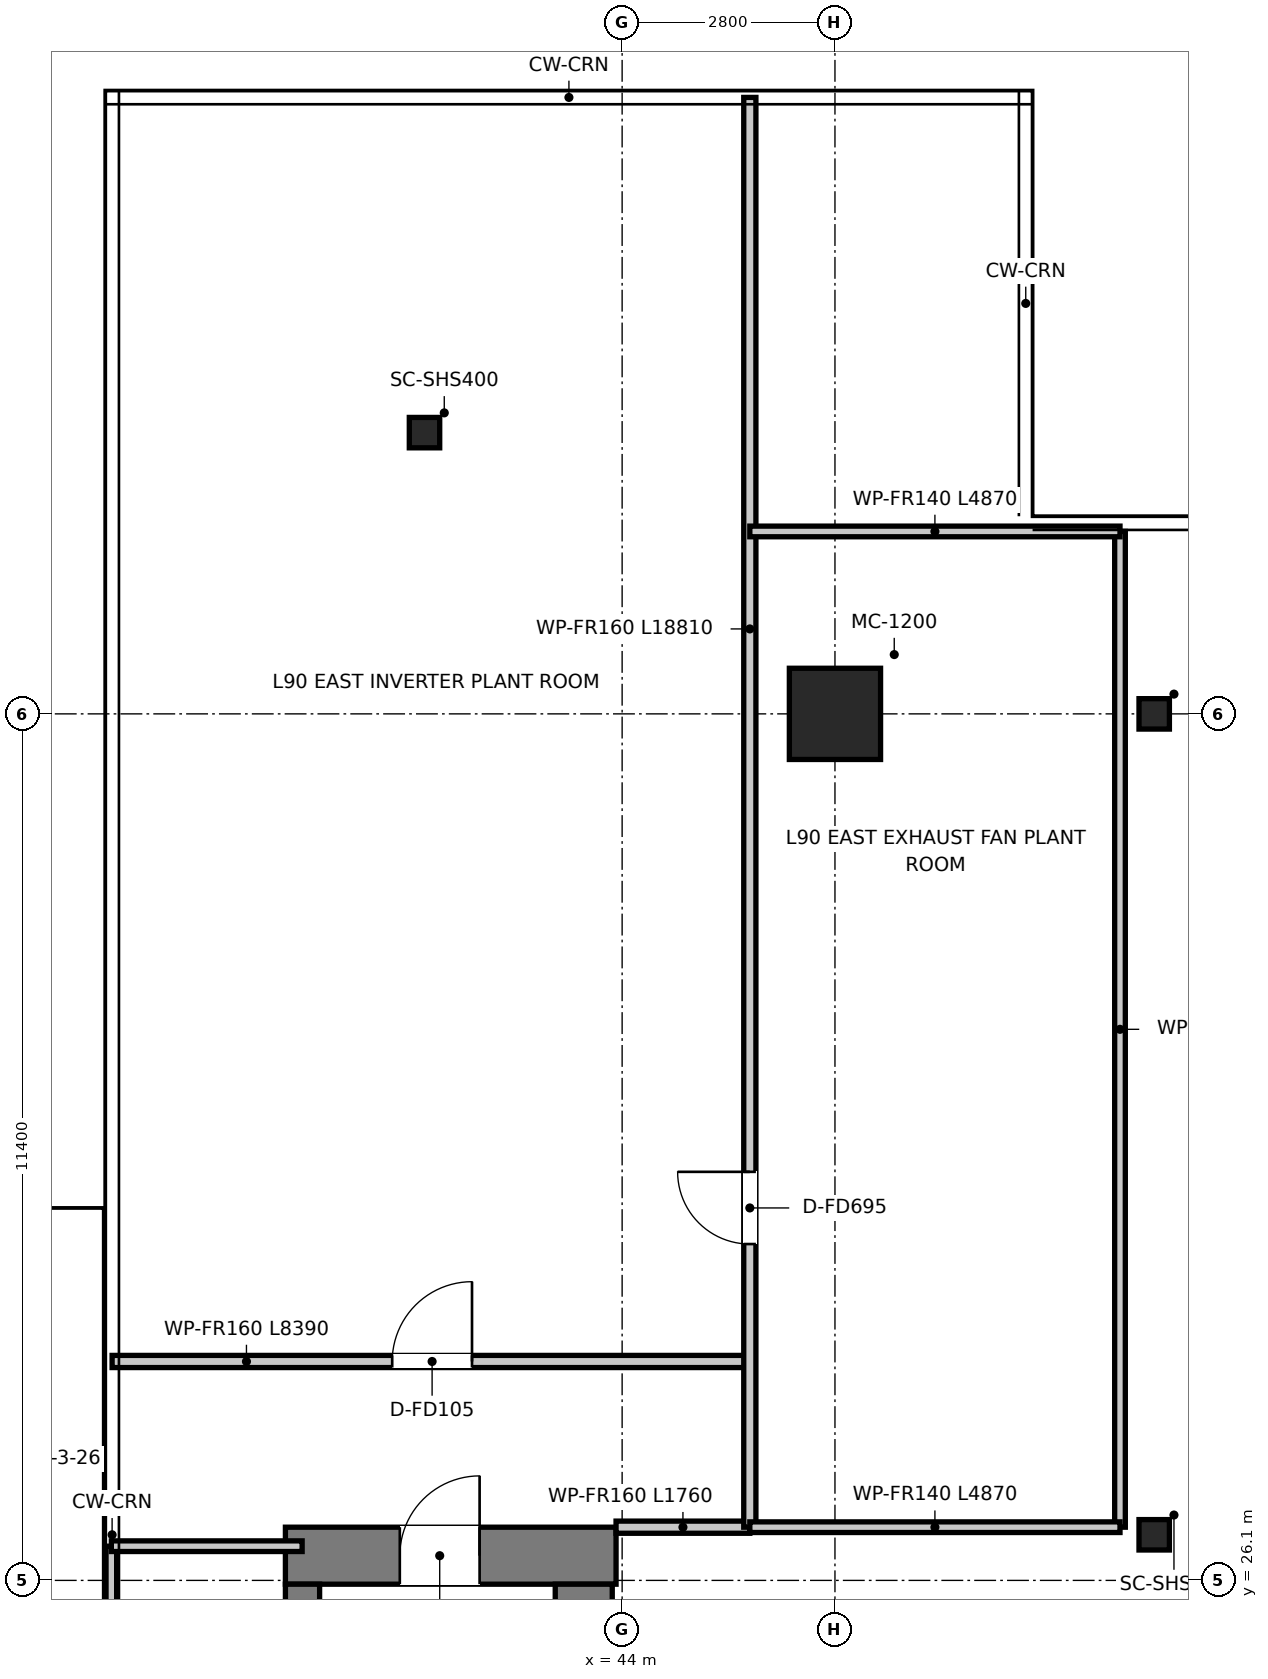
"""IFC4 building model, lengths in metres.
Left out: names, types, materials, properties, quantities, classifications, styles, units other than length and angle.
Written with IfcOpenShell. Run it as: python <this file> out.ifc"""

import sys

from ifc_helpers import new_model, si_unit, direction, frame, frame_2d, origin, origin_2d, place, context, subcontext, project, spatial, rectangle, hollow_rectangle, extrude, source, transform, mapped, element, fill, save


model = new_model("IFC4")
c1 = context("Model", 3, precision=1e-05, world=origin(), true_north=direction((0.0, 1.0)))
c2 = subcontext(c1, "Body", "Model", "MODEL_VIEW")
j1 = project(units=[si_unit("LENGTHUNIT", "METRE"), si_unit("PLANEANGLEUNIT", "RADIAN")], contexts=[c1])
p1 = place(None, origin())
s1 = spatial("IfcSite", under=j1, at=p1, CompositionType="ELEMENT")
p2 = place(p1, origin())
s2 = spatial("IfcBuilding", under=s1, at=p2, CompositionType="ELEMENT")
p3 = place(p2, frame((0.0, 0.0, 367.05)))
s3 = spatial("IfcBuildingStorey", under=s2, at=p3, CompositionType="ELEMENT", Elevation=367.05)
p4 = place(p3, frame((39.57, 26.425, 0.0), z_axis=(0.0, 0.0, 1.0), x_axis=(1.0, 0.0, 0.0)))
e1 = element("IfcWall", 1, at=p4, inside=s3, PredefinedType="SHEAR", context=c2, shape_type="SweptSolid", body=[
    extrude(rectangle(XDim=4.35, YDim=0.75, at=frame_2d((2.175, 0.0))), origin(), (0.0, 0.0, 1.0), 3.8),
])
p5 = place(p4, frame((1.505, 0.0, 0.0)))
e2 = element("IfcOpeningElement", 2, at=p5, cuts=e1, PredefinedType="OPENING", context=c2, shape_type="SweptSolid", body=[
    extrude(rectangle(XDim=1.05, YDim=2.1, at=frame_2d((0.525, 1.05))), frame((0.0, 0.385, 0.0), z_axis=(0.0, -1.0, 0.0), x_axis=(1.0, 0.0, 0.0)), (0.0, 0.0, 1.0), 0.77),
])
p6 = place(p3, frame((39.795, 13.22, 0.0), z_axis=(0.0, 0.0, 1.0), x_axis=(0.0, 1.0, 0.0)))
e3 = element("IfcWall", 3, at=p6, inside=s3, PredefinedType="SHEAR", context=c2, shape_type="SweptSolid", body=[
    extrude(rectangle(XDim=12.83, YDim=0.45, at=frame_2d((6.415, 0.0))), origin(), (0.0, 0.0, 1.0), 3.8),
])
p7 = place(p6, frame((10.58, 0.0, 0.0)))
e4 = element("IfcOpeningElement", 4, at=p7, cuts=e3, PredefinedType="OPENING", context=c2, shape_type="SweptSolid", body=[
    extrude(rectangle(XDim=1.1, YDim=2.15, at=frame_2d((0.55, 1.075))), frame((0.0, 0.235, 0.0), z_axis=(0.0, -1.0, 0.0), x_axis=(1.0, 0.0, 0.0)), (0.0, 0.0, 1.0), 0.47),
])
p8 = place(p3, frame((43.495, 11.25, 0.0), z_axis=(0.0, 0.0, 1.0), x_axis=(0.0, 1.0, 0.0)))
e5 = element("IfcWall", 5, at=p8, inside=s3, PredefinedType="SHEAR", context=c2, shape_type="SweptSolid", body=[
    extrude(rectangle(XDim=14.8, YDim=0.75, at=frame_2d((7.4, 0.0))), origin(), (0.0, 0.0, 1.0), 3.8),
])
m1 = source(origin(), c2, "Body", "SweptSolid", [
    extrude(rectangle(XDim=1.2, YDim=1.2, at=origin_2d()), origin(), (0.0, 0.0, 1.0), 3.8),
])
p9 = place(p3, frame((46.8, 37.5, 0.0), z_axis=(0.0, 0.0, 1.0), x_axis=(1.0, 0.0, 0.0)))
e6 = element("IfcColumn", 6, at=p9, inside=s3, PredefinedType="USERDEFINED", context=c2, shape_type="MappedRepresentation", body=[
    mapped(m1, transform((0.0, 0.0, 0.0), x_axis=(1.0, 0.0, 0.0), y_axis=(0.0, 1.0, 0.0), z_axis=(0.0, 0.0, 1.0), scale=1.0)),
])
m2 = source(origin(), c2, "Body", "SweptSolid", [
    extrude(hollow_rectangle(XDim=0.4, YDim=0.4, WallThickness=0.025, at=origin_2d()), origin(), (0.0, 0.0, 1.0), 3.8),
])
for number, where, z_axis, x_axis in (
    (7, (51.0, 26.7, 0.0), (0.0, 0.0, 1.0), (1.0, 0.0, 0.0)),
    (8, (51.0, 37.5, 0.0), (0.0, 0.0, 1.0), (1.0, 0.0, 0.0)),
    (9, (41.4, 41.2, 0.0), (0.0, 0.0, 1.0), (1.0, 0.0, 0.0)),
):
    element("IfcColumn", number, at=place(p3, frame(where, z_axis=z_axis, x_axis=x_axis)), inside=s3, PredefinedType="COLUMN", context=c2, shape_type="MappedRepresentation", body=[
        mapped(m2, transform((0.0, 0.0, 0.0), x_axis=(1.0, 0.0, 0.0), y_axis=(0.0, 1.0, 0.0), z_axis=(0.0, 0.0, 1.0), scale=1.0)),
    ])
p10 = place(p3, frame((37.28, 22.95, 0.0), z_axis=(0.0, 0.0, 1.0), x_axis=(0.0, 1.0, 0.0)))
e10 = element("IfcWall", 10, at=p10, inside=s3, PredefinedType="PARTITIONING", context=c2, shape_type="SweptSolid", body=[
    extrude(rectangle(XDim=3.6, YDim=0.14, at=frame_2d((1.8, 0.0))), origin(), (0.0, 0.0, 1.0), 3.5),
])
p11 = place(p3, frame((37.28, 26.55, 0.0), z_axis=(0.0, 0.0, 1.0), x_axis=(1.0, 0.0, 0.0)))
e11 = element("IfcWall", 11, at=p11, inside=s3, PredefinedType="PARTITIONING", context=c2, shape_type="SweptSolid", body=[
    extrude(rectangle(XDim=2.51, YDim=0.14, at=frame_2d((1.255, 0.0))), origin(), (0.0, 0.0, 1.0), 3.5),
])
p12 = place(p3, frame((37.29, 28.98, 0.0), z_axis=(0.0, 0.0, 1.0), x_axis=(1.0, 0.0, 0.0)))
e12 = element("IfcWall", 12, at=p12, inside=s3, PredefinedType="PARTITIONING", context=c2, shape_type="SweptSolid", body=[
    extrude(rectangle(XDim=8.39, YDim=0.16, at=frame_2d((4.195, 0.0))), origin(), (0.0, 0.0, 1.0), 3.01),
])
p13 = place(p12, frame((3.685, 0.0, 0.0)))
e13 = element("IfcOpeningElement", 13, at=p13, cuts=e12, PredefinedType="OPENING", context=c2, shape_type="SweptSolid", body=[
    extrude(rectangle(XDim=1.05, YDim=2.1, at=frame_2d((0.525, 1.05))), frame((0.0, 0.09, 0.0), z_axis=(0.0, -1.0, 0.0), x_axis=(1.0, 0.0, 0.0)), (0.0, 0.0, 1.0), 0.18),
])
p14 = place(p3, frame((43.92, 26.8, 0.0), z_axis=(0.0, 0.0, 1.0), x_axis=(1.0, 0.0, 0.0)))
e14 = element("IfcWall", 14, at=p14, inside=s3, PredefinedType="PARTITIONING", context=c2, shape_type="SweptSolid", body=[
    extrude(rectangle(XDim=1.76, YDim=0.16, at=frame_2d((0.88, 0.0))), origin(), (0.0, 0.0, 1.0), 3.5),
])
p15 = place(p3, frame((45.68, 26.8, 0.0), z_axis=(0.0, 0.0, 1.0), x_axis=(0.0, 1.0, 0.0)))
e15 = element("IfcWall", 15, at=p15, inside=s3, PredefinedType="PARTITIONING", context=c2, shape_type="SweptSolid", body=[
    extrude(rectangle(XDim=18.81, YDim=0.16, at=frame_2d((9.405, 0.0))), origin(), (0.0, 0.0, 1.0), 3.01),
])
p16 = place(p15, frame((3.725, 0.0, 0.0)))
e16 = element("IfcOpeningElement", 16, at=p16, cuts=e15, PredefinedType="OPENING", context=c2, shape_type="SweptSolid", body=[
    extrude(rectangle(XDim=0.95, YDim=2.1, at=frame_2d((0.475, 1.05))), frame((0.0, 0.09, 0.0), z_axis=(0.0, -1.0, 0.0), x_axis=(1.0, 0.0, 0.0)), (0.0, 0.0, 1.0), 0.18),
])
p17 = place(p3, frame((50.55, 26.8, 0.0), z_axis=(0.0, 0.0, 1.0), x_axis=(0.0, 1.0, 0.0)))
e17 = element("IfcWall", 17, at=p17, inside=s3, PredefinedType="PARTITIONING", context=c2, shape_type="SweptSolid", body=[
    extrude(rectangle(XDim=13.1, YDim=0.14, at=frame_2d((6.55, 0.0))), origin(), (0.0, 0.0, 1.0), 3.01),
])
p18 = place(p3, frame((45.68, 26.8, 0.0), z_axis=(0.0, 0.0, 1.0), x_axis=(1.0, 0.0, 0.0)))
e18 = element("IfcWall", 18, at=p18, inside=s3, PredefinedType="PARTITIONING", context=c2, shape_type="SweptSolid", body=[
    extrude(rectangle(XDim=4.87, YDim=0.14, at=frame_2d((2.435, 0.0))), origin(), (0.0, 0.0, 1.0), 3.01),
])
p19 = place(p3, frame((45.68, 39.9, 0.0), z_axis=(0.0, 0.0, 1.0), x_axis=(1.0, 0.0, 0.0)))
e19 = element("IfcWall", 19, at=p19, inside=s3, PredefinedType="PARTITIONING", context=c2, shape_type="SweptSolid", body=[
    extrude(rectangle(XDim=4.87, YDim=0.14, at=frame_2d((2.435, 0.0))), origin(), (0.0, 0.0, 1.0), 3.5),
])
p20 = place(p5, origin())
e20 = element("IfcDoor", 20, at=p20, inside=s3, OperationType="SINGLE_SWING_RIGHT", PredefinedType="DOOR", context=c2, shape_type="SweptSolid", body=[
    extrude(rectangle(XDim=1.05, YDim=2.1, at=frame_2d((0.525, 1.05))), frame((0.0, 0.025, 0.0), z_axis=(0.0, -1.0, 0.0), x_axis=(1.0, 0.0, 0.0)), (0.0, 0.0, 1.0), 0.05),
])
fill(e2, e20)
p21 = place(p13, origin())
e21 = element("IfcDoor", 21, at=p21, inside=s3, OperationType="SINGLE_SWING_RIGHT", PredefinedType="DOOR", context=c2, shape_type="SweptSolid", body=[
    extrude(rectangle(XDim=1.05, YDim=2.1, at=frame_2d((0.525, 1.05))), frame((0.0, 0.025, 0.0), z_axis=(0.0, -1.0, 0.0), x_axis=(1.0, 0.0, 0.0)), (0.0, 0.0, 1.0), 0.05),
])
fill(e13, e21)
p22 = place(p16, origin())
e22 = element("IfcDoor", 22, at=p22, inside=s3, OperationType="SINGLE_SWING_RIGHT", PredefinedType="DOOR", context=c2, shape_type="SweptSolid", body=[
    extrude(rectangle(XDim=0.95, YDim=2.1, at=frame_2d((0.475, 1.05))), frame((0.0, 0.025, 0.0), z_axis=(0.0, -1.0, 0.0), x_axis=(1.0, 0.0, 0.0)), (0.0, 0.0, 1.0), 0.05),
])
fill(e16, e22)
save(model, sys.argv[1])
